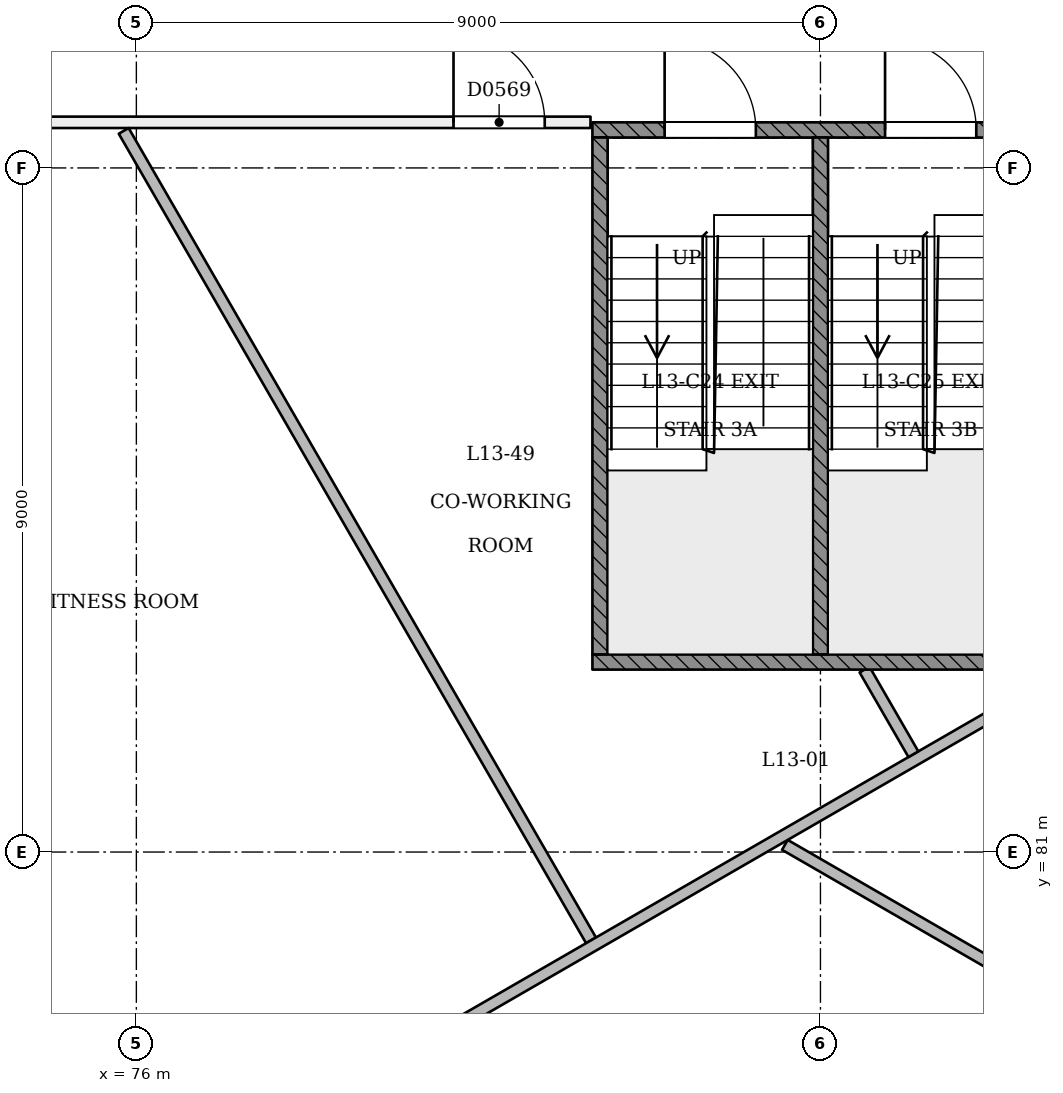
"""IFC4 building model, lengths in metres.
Left out: names, types, materials, properties, quantities, classifications, styles, units other than length and angle.
Written with IfcOpenShell. Run it as: python <this file> out.ifc"""

import sys

from ifc_helpers import new_model, si_unit, direction, frame, frame_2d, origin, place, context, subcontext, project, spatial, rectangle, extrude, element, fill, save


model = new_model("IFC4")
c1 = context("Model", 3, precision=1e-05, world=origin(), true_north=direction((0.0, 1.0)))
c2 = subcontext(c1, "Body", "Model", "MODEL_VIEW")
j1 = project(units=[si_unit("LENGTHUNIT", "METRE"), si_unit("PLANEANGLEUNIT", "RADIAN")], contexts=[c1])
p1 = place(None, origin())
s1 = spatial("IfcSite", under=j1, at=p1, CompositionType="ELEMENT")
p2 = place(p1, origin())
s2 = spatial("IfcBuilding", under=s1, at=p2, CompositionType="ELEMENT")
p3 = place(p2, frame((0.0, 0.0, 55.8)))
s3 = spatial("IfcBuildingStorey", under=s2, at=p3, CompositionType="ELEMENT", Elevation=55.8)
p4 = place(p3, frame((64.083, 93.447, 0.0), z_axis=(0.0, 0.0, 1.0), x_axis=(0.5000018851, -0.866024315419, 0.0)))
e1 = element("IfcWall", 1, at=p4, inside=s3, PredefinedType="PARTITIONING", context=c2, shape_type="SweptSolid", body=[
    extrude(rectangle(XDim=36.0, YDim=0.15, at=frame_2d((18.0, 0.0))), origin(), (0.0, 0.0, 1.0), 2.7),
])
p5 = place(p4, frame((0.605, 0.0, 0.0)))
e2 = element("IfcOpeningElement", 2, at=p5, cuts=e1, PredefinedType="OPENING", context=c2, shape_type="SweptSolid", body=[
    extrude(rectangle(XDim=1.0, YDim=2.1, at=frame_2d((0.5, 1.05))), frame((0.0, 0.085, 0.0), z_axis=(0.0, -1.0, 0.0), x_axis=(1.0, 0.0, 0.0)), (0.0, 0.0, 1.0), 0.171),
])
p6 = place(p4, frame((7.28, 0.0, 0.0)))
e3 = element("IfcOpeningElement", 3, at=p6, cuts=e1, PredefinedType="OPENING", context=c2, shape_type="SweptSolid", body=[
    extrude(rectangle(XDim=1.0, YDim=2.1, at=frame_2d((0.5, 1.05))), frame((0.0, 0.085, 0.0), z_axis=(0.0, -1.0, 0.0), x_axis=(1.0, 0.0, 0.0)), (0.0, 0.0, 1.0), 0.171),
])
p7 = place(p4, frame((9.72, 0.0, 0.0)))
e4 = element("IfcOpeningElement", 4, at=p7, cuts=e1, PredefinedType="OPENING", context=c2, shape_type="SweptSolid", body=[
    extrude(rectangle(XDim=1.0, YDim=2.1, at=frame_2d((0.5, 1.05))), frame((0.0, 0.085, 0.0), z_axis=(0.0, -1.0, 0.0), x_axis=(1.0, 0.0, 0.0)), (0.0, 0.0, 1.0), 0.171),
])
p8 = place(p4, frame((16.395, 0.0, 0.0)))
e5 = element("IfcOpeningElement", 5, at=p8, cuts=e1, PredefinedType="OPENING", context=c2, shape_type="SweptSolid", body=[
    extrude(rectangle(XDim=1.0, YDim=2.1, at=frame_2d((0.5, 1.05))), frame((0.0, 0.085, 0.0), z_axis=(0.0, -1.0, 0.0), x_axis=(1.0, 0.0, 0.0)), (0.0, 0.0, 1.0), 0.171),
])
p9 = place(p4, frame((18.72, 0.0, 0.0)))
e6 = element("IfcOpeningElement", 6, at=p9, cuts=e1, PredefinedType="OPENING", context=c2, shape_type="SweptSolid", body=[
    extrude(rectangle(XDim=1.0, YDim=2.1, at=frame_2d((0.5, 1.05))), frame((0.0, 0.085, 0.0), z_axis=(0.0, -1.0, 0.0), x_axis=(1.0, 0.0, 0.0)), (0.0, 0.0, 1.0), 0.171),
])
p10 = place(p4, frame((25.395, 0.0, 0.0)))
e7 = element("IfcOpeningElement", 7, at=p10, cuts=e1, PredefinedType="OPENING", context=c2, shape_type="SweptSolid", body=[
    extrude(rectangle(XDim=1.0, YDim=2.1, at=frame_2d((0.5, 1.05))), frame((0.0, 0.085, 0.0), z_axis=(0.0, -1.0, 0.0), x_axis=(1.0, 0.0, 0.0)), (0.0, 0.0, 1.0), 0.171),
])
p11 = place(p4, frame((27.605, 0.0, 0.0)))
e8 = element("IfcOpeningElement", 8, at=p11, cuts=e1, PredefinedType="OPENING", context=c2, shape_type="SweptSolid", body=[
    extrude(rectangle(XDim=1.0, YDim=2.1, at=frame_2d((0.5, 1.05))), frame((0.0, 0.085, 0.0), z_axis=(0.0, -1.0, 0.0), x_axis=(1.0, 0.0, 0.0)), (0.0, 0.0, 1.0), 0.171),
])
p12 = place(p4, frame((34.28, 0.0, 0.0)))
e9 = element("IfcOpeningElement", 9, at=p12, cuts=e1, PredefinedType="OPENING", context=c2, shape_type="SweptSolid", body=[
    extrude(rectangle(XDim=1.0, YDim=2.1, at=frame_2d((0.5, 1.05))), frame((0.0, 0.085, 0.0), z_axis=(0.0, -1.0, 0.0), x_axis=(1.0, 0.0, 0.0)), (0.0, 0.0, 1.0), 0.171),
])
p13 = place(p3, frame((85.99, 58.932, 0.0), z_axis=(0.0, 0.0, 1.0), x_axis=(0.500001547762, 0.866024510182, 0.0)))
e10 = element("IfcWall", 10, at=p13, inside=s3, PredefinedType="PARTITIONING", context=c2, shape_type="SweptSolid", body=[
    extrude(rectangle(XDim=42.454, YDim=0.15, at=frame_2d((21.227, 0.0))), origin(), (0.0, 0.0, 1.0), 2.7),
])
p14 = place(p13, frame((3.577, 0.0, 0.0)))
e11 = element("IfcOpeningElement", 11, at=p14, cuts=e10, PredefinedType="OPENING", context=c2, shape_type="SweptSolid", body=[
    extrude(rectangle(XDim=1.2, YDim=2.1, at=frame_2d((0.6, 1.05))), frame((0.0, 0.085, 0.0), z_axis=(0.0, -1.0, 0.0), x_axis=(1.0, 0.0, 0.0)), (0.0, 0.0, 1.0), 0.171),
])
p15 = place(p13, frame((11.134, 0.0, 0.0)))
e12 = element("IfcOpeningElement", 12, at=p15, cuts=e10, PredefinedType="OPENING", context=c2, shape_type="SweptSolid", body=[
    extrude(rectangle(XDim=1.0, YDim=2.1, at=frame_2d((0.5, 1.05))), frame((0.0, 0.085, 0.0), z_axis=(0.0, -1.0, 0.0), x_axis=(1.0, 0.0, 0.0)), (0.0, 0.0, 1.0), 0.171),
])
p16 = place(p13, frame((13.575, 0.0, 0.0)))
e13 = element("IfcOpeningElement", 13, at=p16, cuts=e10, PredefinedType="OPENING", context=c2, shape_type="SweptSolid", body=[
    extrude(rectangle(XDim=1.0, YDim=2.1, at=frame_2d((0.5, 1.05))), frame((0.0, 0.085, 0.0), z_axis=(0.0, -1.0, 0.0), x_axis=(1.0, 0.0, 0.0)), (0.0, 0.0, 1.0), 0.171),
])
p17 = place(p13, frame((20.134, 0.0, 0.0)))
e14 = element("IfcOpeningElement", 14, at=p17, cuts=e10, PredefinedType="OPENING", context=c2, shape_type="SweptSolid", body=[
    extrude(rectangle(XDim=1.0, YDim=2.1, at=frame_2d((0.5, 1.05))), frame((0.0, 0.085, 0.0), z_axis=(0.0, -1.0, 0.0), x_axis=(1.0, 0.0, 0.0)), (0.0, 0.0, 1.0), 0.171),
])
p18 = place(p13, frame((22.575, 0.0, 0.0)))
e15 = element("IfcOpeningElement", 15, at=p18, cuts=e10, PredefinedType="OPENING", context=c2, shape_type="SweptSolid", body=[
    extrude(rectangle(XDim=1.0, YDim=2.1, at=frame_2d((0.5, 1.05))), frame((0.0, 0.085, 0.0), z_axis=(0.0, -1.0, 0.0), x_axis=(1.0, 0.0, 0.0)), (0.0, 0.0, 1.0), 0.171),
])
p19 = place(p13, frame((29.134, 0.0, 0.0)))
e16 = element("IfcOpeningElement", 16, at=p19, cuts=e10, PredefinedType="OPENING", context=c2, shape_type="SweptSolid", body=[
    extrude(rectangle(XDim=1.0, YDim=2.1, at=frame_2d((0.5, 1.05))), frame((0.0, 0.085, 0.0), z_axis=(0.0, -1.0, 0.0), x_axis=(1.0, 0.0, 0.0)), (0.0, 0.0, 1.0), 0.171),
])
p20 = place(p13, frame((31.575, 0.0, 0.0)))
e17 = element("IfcOpeningElement", 17, at=p20, cuts=e10, PredefinedType="OPENING", context=c2, shape_type="SweptSolid", body=[
    extrude(rectangle(XDim=1.0, YDim=2.1, at=frame_2d((0.5, 1.05))), frame((0.0, 0.085, 0.0), z_axis=(0.0, -1.0, 0.0), x_axis=(1.0, 0.0, 0.0)), (0.0, 0.0, 1.0), 0.171),
])
p21 = place(p13, frame((38.134, 0.0, 0.0)))
e18 = element("IfcOpeningElement", 18, at=p21, cuts=e10, PredefinedType="OPENING", context=c2, shape_type="SweptSolid", body=[
    extrude(rectangle(XDim=1.0, YDim=2.1, at=frame_2d((0.5, 1.05))), frame((0.0, 0.085, 0.0), z_axis=(0.0, -1.0, 0.0), x_axis=(1.0, 0.0, 0.0)), (0.0, 0.0, 1.0), 0.171),
])
p22 = place(p13, frame((41.161, 0.0, 0.0)))
e19 = element("IfcOpeningElement", 19, at=p22, cuts=e10, PredefinedType="OPENING", context=c2, shape_type="SweptSolid", body=[
    extrude(rectangle(XDim=1.0, YDim=2.1, at=frame_2d((0.5, 1.05))), frame((0.0, 0.085, 0.0), z_axis=(0.0, -1.0, 0.0), x_axis=(1.0, 0.0, 0.0)), (0.0, 0.0, 1.0), 0.171),
])
p23 = place(p3, frame((67.935, 90.6, 0.0), z_axis=(0.0, 0.0, 1.0), x_axis=(1.0, 0.0, 0.0)))
e20 = element("IfcWall", 20, at=p23, inside=s3, PredefinedType="PARTITIONING", context=c2, shape_type="SweptSolid", body=[
    extrude(rectangle(XDim=14.04, YDim=0.15, at=frame_2d((7.02, 0.0))), origin(), (0.0, 0.0, 1.0), 3.1),
])
p24 = place(p23, frame((12.238, 0.0, 0.0)))
e21 = element("IfcOpeningElement", 21, at=p24, cuts=e20, PredefinedType="OPENING", context=c2, shape_type="SweptSolid", body=[
    extrude(rectangle(XDim=1.2, YDim=2.1, at=frame_2d((0.6, 1.05))), frame((0.0, 0.085, 0.0), z_axis=(0.0, -1.0, 0.0), x_axis=(1.0, 0.0, 0.0)), (0.0, 0.0, 1.0), 0.171),
])
p25 = place(p3, frame((85.0, 60.817, 0.0), z_axis=(0.0, 0.0, 1.0), x_axis=(-0.49999631887, 0.866027529076, 0.0)))
e22 = element("IfcWall", 22, at=p25, inside=s3, PredefinedType="PARTITIONING", context=c2, shape_type="SweptSolid", body=[
    extrude(rectangle(XDim=34.391, YDim=0.15, at=frame_2d((17.195, 0.0))), origin(), (0.0, 0.0, 1.0), 3.1),
])
p26 = place(p25, frame((24.599, 0.0, 0.0)))
e23 = element("IfcOpeningElement", 23, at=p26, cuts=e22, PredefinedType="OPENING", context=c2, shape_type="SweptSolid", body=[
    extrude(rectangle(XDim=1.2, YDim=2.1, at=frame_2d((0.6, 1.05))), frame((0.0, 0.085, 0.0), z_axis=(0.0, -1.0, 0.0), x_axis=(1.0, 0.0, 0.0)), (0.0, 0.0, 1.0), 0.171),
])
p27 = place(p25, frame((7.281, 0.0, 0.0)))
e24 = element("IfcOpeningElement", 24, at=p27, cuts=e22, PredefinedType="OPENING", context=c2, shape_type="SweptSolid", body=[
    extrude(rectangle(XDim=1.2, YDim=2.1, at=frame_2d((0.6, 1.05))), frame((0.0, 0.085, 0.0), z_axis=(0.0, -1.0, 0.0), x_axis=(1.0, 0.0, 0.0)), (0.0, 0.0, 1.0), 0.171),
])
p28 = place(p3, frame((92.208, 76.662, 0.0), z_axis=(0.0, 0.0, 1.0), x_axis=(-0.8660209256, 0.500007756363, 0.0)))
e25 = element("IfcWall", 25, at=p28, inside=s3, PredefinedType="PARTITIONING", context=c2, shape_type="SweptSolid", body=[
    extrude(rectangle(XDim=8.864, YDim=0.15, at=frame_2d((4.432, 0.0))), origin(), (0.0, 0.0, 1.0), 3.1),
])
p29 = place(p3, frame((81.982, 79.838, 0.0), z_axis=(0.0, 0.0, 1.0), x_axis=(-0.500008318019, 0.866020601321, 0.0)))
e26 = element("IfcWall", 26, at=p29, inside=s3, PredefinedType="PARTITIONING", context=c2, shape_type="SweptSolid", body=[
    extrude(rectangle(XDim=12.297, YDim=0.15, at=frame_2d((6.148, 0.0))), origin(), (0.0, 0.0, 1.0), 3.1),
])
p30 = place(p3, frame((100.529, 90.46, 0.0), z_axis=(0.0, 0.0, 1.0), x_axis=(-0.866026416576, -0.499998245789, 0.0)))
e27 = element("IfcWall", 27, at=p30, inside=s3, PredefinedType="PARTITIONING", context=c2, shape_type="SweptSolid", body=[
    extrude(rectangle(XDim=26.59, YDim=0.15, at=frame_2d((13.295, 0.0))), origin(), (0.0, 0.0, 1.0), 3.1),
])
p31 = place(p3, frame((85.58, 83.4, 0.0), z_axis=(0.0, 0.0, 1.0), x_axis=(0.500122526358, -0.865954651601, 0.0)))
e28 = element("IfcWall", 28, at=p31, inside=s3, PredefinedType="PARTITIONING", context=c2, shape_type="SweptSolid", body=[
    extrude(rectangle(XDim=1.285, YDim=0.15, at=frame_2d((0.643, 0.0))), origin(), (0.0, 0.0, 1.0), 3.1),
])
p32 = place(p3, frame((82.0, 90.5, 0.0), z_axis=(0.0, 0.0, 1.0), x_axis=(1.0, 0.0, 0.0)))
e29 = element("IfcWall", 29, at=p32, inside=s3, PredefinedType="SOLIDWALL", context=c2, shape_type="SweptSolid", body=[
    extrude(rectangle(XDim=6.0, YDim=0.2, at=frame_2d((3.0, 0.0))), origin(), (0.0, 0.0, 1.0), 3.1),
])
p33 = place(p32, frame((0.95, 0.0, 0.0)))
e30 = element("IfcOpeningElement", 30, at=p33, cuts=e29, PredefinedType="OPENING", context=c2, shape_type="SweptSolid", body=[
    extrude(rectangle(XDim=1.2, YDim=2.1, at=frame_2d((0.6, 1.05))), frame((0.0, 0.11, 0.0), z_axis=(0.0, -1.0, 0.0), x_axis=(1.0, 0.0, 0.0)), (0.0, 0.0, 1.0), 0.221),
])
p34 = place(p32, frame((3.85, 0.0, 0.0)))
e31 = element("IfcOpeningElement", 31, at=p34, cuts=e29, PredefinedType="OPENING", context=c2, shape_type="SweptSolid", body=[
    extrude(rectangle(XDim=1.2, YDim=2.1, at=frame_2d((0.6, 1.05))), frame((0.0, 0.11, 0.0), z_axis=(0.0, -1.0, 0.0), x_axis=(1.0, 0.0, 0.0)), (0.0, 0.0, 1.0), 0.221),
])
p35 = place(p3, frame((82.0, 83.5, 0.0), z_axis=(0.0, 0.0, 1.0), x_axis=(1.0, 0.0, 0.0)))
e32 = element("IfcWall", 32, at=p35, inside=s3, PredefinedType="SOLIDWALL", context=c2, shape_type="SweptSolid", body=[
    extrude(rectangle(XDim=6.0, YDim=0.2, at=frame_2d((3.0, 0.0))), origin(), (0.0, 0.0, 1.0), 3.1),
])
for number, where, z_axis, x_axis in (
    (33, (82.1, 83.6, 0.0), (0.0, 0.0, 1.0), (0.0, 1.0, 0.0)),
    (34, (85.0, 83.6, 0.0), (0.0, 0.0, 1.0), (0.0, 1.0, 0.0)),
):
    element("IfcWall", number, at=place(p3, frame(where, z_axis=z_axis, x_axis=x_axis)), inside=s3, PredefinedType="SOLIDWALL", context=c2, shape_type="SweptSolid", body=[
        extrude(rectangle(XDim=6.8, YDim=0.2, at=frame_2d((3.4, 0.0))), origin(), (0.0, 0.0, 1.0), 3.1),
    ])
p36 = place(p24, origin())
e35 = element("IfcDoor", 35, at=p36, inside=s3, OperationType="SINGLE_SWING_LEFT", PredefinedType="NOTDEFINED", context=c2, shape_type="SweptSolid", body=[
    extrude(rectangle(XDim=1.2, YDim=2.1, at=frame_2d((0.6, 1.05))), frame((0.0, 0.025, 0.0), z_axis=(0.0, -1.0, 0.0), x_axis=(1.0, 0.0, 0.0)), (0.0, 0.0, 1.0), 0.05),
])
fill(e21, e35)
p37 = place(p33, origin())
e36 = element("IfcDoor", 36, at=p37, inside=s3, OperationType="SINGLE_SWING_LEFT", PredefinedType="NOTDEFINED", context=c2, shape_type="SweptSolid", body=[
    extrude(rectangle(XDim=1.2, YDim=2.1, at=frame_2d((0.6, 1.05))), frame((0.0, 0.025, 0.0), z_axis=(0.0, -1.0, 0.0), x_axis=(1.0, 0.0, 0.0)), (0.0, 0.0, 1.0), 0.05),
])
fill(e30, e36)
p38 = place(p34, origin())
e37 = element("IfcDoor", 37, at=p38, inside=s3, OperationType="SINGLE_SWING_LEFT", PredefinedType="NOTDEFINED", context=c2, shape_type="SweptSolid", body=[
    extrude(rectangle(XDim=1.2, YDim=2.1, at=frame_2d((0.6, 1.05))), frame((0.0, 0.025, 0.0), z_axis=(0.0, -1.0, 0.0), x_axis=(1.0, 0.0, 0.0)), (0.0, 0.0, 1.0), 0.05),
])
fill(e31, e37)
save(model, sys.argv[1])
